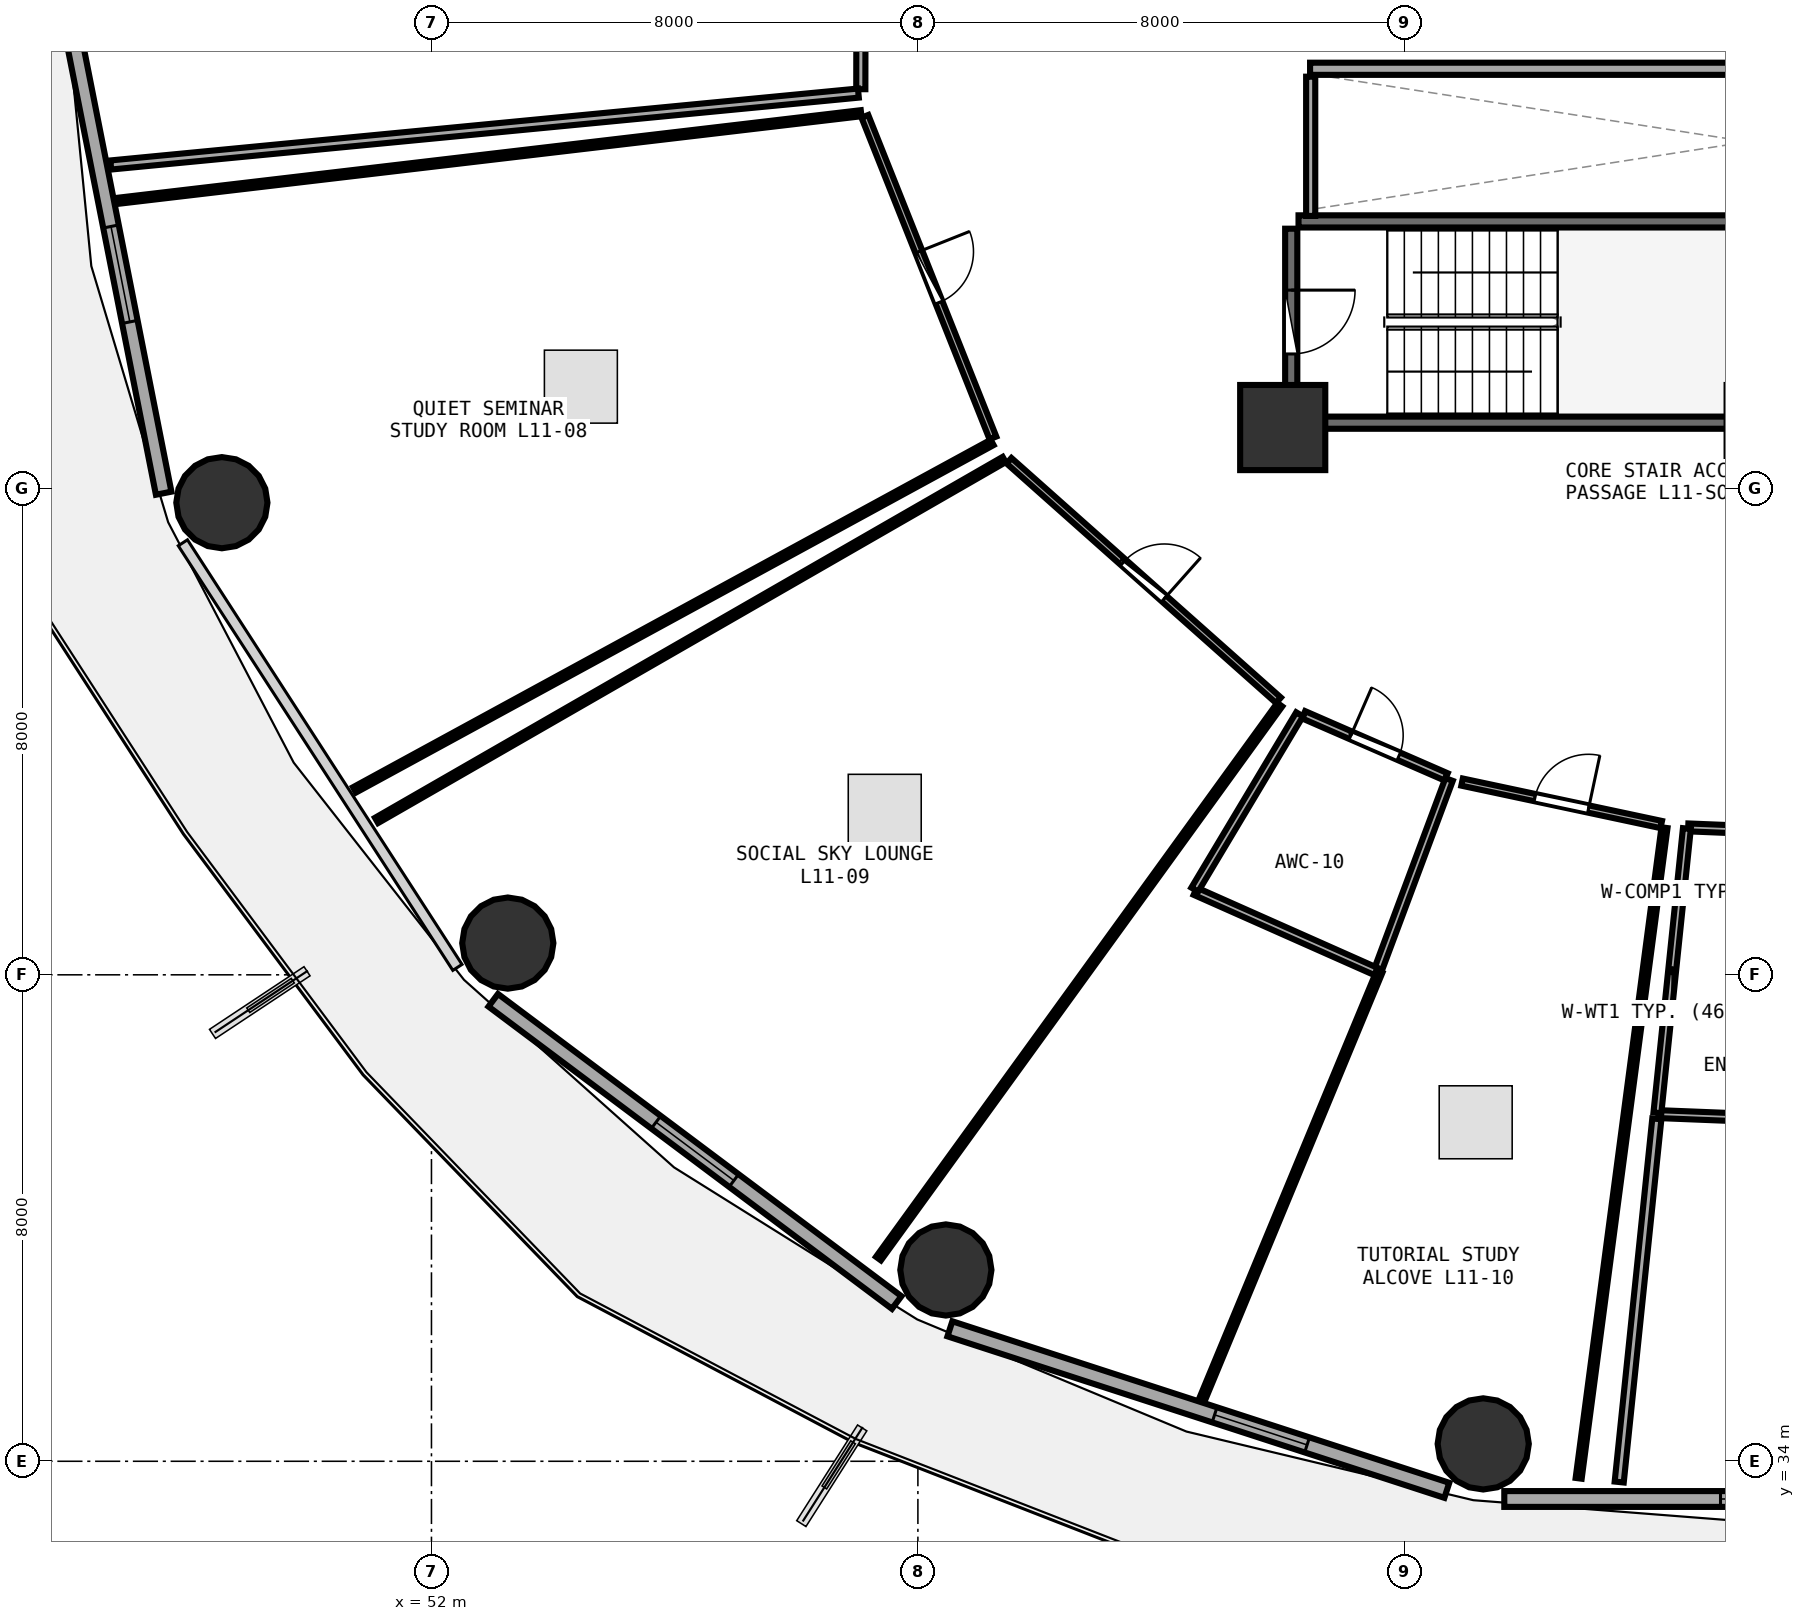
"""IFC4 building model, lengths in metres.
Left out: names, types, materials, properties, quantities, classifications, styles, units other than length and angle.
Written with IfcOpenShell. Run it as: python <this file> out.ifc"""

import sys

from ifc_helpers import new_model, si_unit, direction, frame, frame_2d, origin, origin_2d, place, context, subcontext, project, spatial, rectangle, circle, extrude, element, fill, save


model = new_model("IFC4")
c1 = context("Model", 3, precision=1e-05, world=origin(), true_north=direction((0.0, 1.0)))
c2 = subcontext(c1, "Body", "Model", "MODEL_VIEW")
j1 = project(units=[si_unit("LENGTHUNIT", "METRE"), si_unit("PLANEANGLEUNIT", "RADIAN")], contexts=[c1])
p1 = place(None, origin())
s1 = spatial("IfcSite", under=j1, at=p1, CompositionType="ELEMENT")
p2 = place(p1, origin())
s2 = spatial("IfcBuilding", under=s1, at=p2, CompositionType="ELEMENT")
p3 = place(p2, frame((0.0, 0.0, 45.0)))
s3 = spatial("IfcBuildingStorey", under=s2, at=p3, CompositionType="ELEMENT", Elevation=45.0)
p4 = place(p3, frame((66.0, 51.0, 0.0), z_axis=(0.0, 0.0, 1.0), x_axis=(1.0, 0.0, 0.0)))
e1 = element("IfcColumn", 1, at=p4, inside=s3, PredefinedType="PILASTER", context=c2, shape_type="SweptSolid", body=[
    extrude(rectangle(XDim=1.4, YDim=1.4, at=origin_2d()), origin(), (0.0, 0.0, 1.0), 3.75),
])
for number, where, z_axis, x_axis in (
    (2, (48.553, 49.764, 0.0), (0.0, 0.0, 1.0), (1.0, 0.0, 0.0)),
    (3, (53.256, 42.522, 0.0), (0.0, 0.0, 1.0), (1.0, 0.0, 0.0)),
    (4, (60.46, 37.146, 0.0), (0.0, 0.0, 1.0), (1.0, 0.0, 0.0)),
    (5, (69.298, 34.286, 0.0), (0.0, 0.0, 1.0), (1.0, 0.0, 0.0)),
):
    element("IfcColumn", number, at=place(p3, frame(where, z_axis=z_axis, x_axis=x_axis)), inside=s3, PredefinedType="COLUMN", context=c2, shape_type="SweptSolid", body=[
        extrude(circle(Radius=0.75, at=origin_2d()), origin(), (0.0, 0.0, 1.0), 3.75),
    ])
p5 = place(p3, frame((46.104, 57.477, 0.0), z_axis=(0.0, 0.0, 1.0), x_axis=(0.193726159581, -0.98105564322, 0.0)))
e6 = element("IfcWall", 6, at=p5, inside=s3, PredefinedType="SOLIDWALL", context=c2, shape_type="SweptSolid", body=[
    extrude(rectangle(XDim=7.703, YDim=0.26, at=frame_2d((3.851, 0.0))), origin(), (0.0, 0.0, 1.0), 3.475),
])
p6 = place(p5, frame((3.231, 0.0, 0.85)))
e7 = element("IfcOpeningElement", 7, at=p6, cuts=e6, PredefinedType="OPENING", context=c2, shape_type="SweptSolid", body=[
    extrude(rectangle(XDim=1.6, YDim=1.45, at=frame_2d((0.8, 0.725))), frame((0.0, 0.14, 0.0), z_axis=(0.0, -1.0, 0.0), x_axis=(1.0, 0.0, 0.0)), (0.0, 0.0, 1.0), 0.28),
])
p7 = place(p3, frame((53.016, 41.582, 0.0), z_axis=(0.0, 0.0, 1.0), x_axis=(0.80030733173, -0.599590005569, 0.0)))
e8 = element("IfcWall", 8, at=p7, inside=s3, PredefinedType="SOLIDWALL", context=c2, shape_type="SweptSolid", body=[
    extrude(rectangle(XDim=8.291, YDim=0.26, at=frame_2d((4.145, 0.0))), origin(), (0.0, 0.0, 1.0), 3.475),
])
p8 = place(p7, frame((3.345, 0.0, 0.85)))
e9 = element("IfcOpeningElement", 9, at=p8, cuts=e8, PredefinedType="OPENING", context=c2, shape_type="SweptSolid", body=[
    extrude(rectangle(XDim=1.6, YDim=1.45, at=frame_2d((0.8, 0.725))), frame((0.0, 0.14, 0.0), z_axis=(0.0, -1.0, 0.0), x_axis=(1.0, 0.0, 0.0)), (0.0, 0.0, 1.0), 0.28),
])
p9 = place(p3, frame((60.526, 36.178, 0.0), z_axis=(0.0, 0.0, 1.0), x_axis=(0.951039914291, -0.309068085421, 0.0)))
e10 = element("IfcWall", 10, at=p9, inside=s3, PredefinedType="SOLIDWALL", context=c2, shape_type="SweptSolid", body=[
    extrude(rectangle(XDim=8.594, YDim=0.26, at=frame_2d((4.297, 0.0))), origin(), (0.0, 0.0, 1.0), 3.475),
])
p10 = place(p9, frame((4.577, 0.0, 0.85)))
e11 = element("IfcOpeningElement", 11, at=p10, cuts=e10, PredefinedType="OPENING", context=c2, shape_type="SweptSolid", body=[
    extrude(rectangle(XDim=1.6, YDim=1.45, at=frame_2d((0.8, 0.725))), frame((0.0, 0.14, 0.0), z_axis=(0.0, -1.0, 0.0), x_axis=(1.0, 0.0, 0.0)), (0.0, 0.0, 1.0), 0.28),
])
p11 = place(p3, frame((69.644, 33.38, 0.0), z_axis=(0.0, 0.0, 1.0), x_axis=(1.0, 0.0, 0.0)))
e12 = element("IfcWall", 12, at=p11, inside=s3, PredefinedType="SOLIDWALL", context=c2, shape_type="SweptSolid", body=[
    extrude(rectangle(XDim=8.712, YDim=0.26, at=frame_2d((4.356, 0.0))), origin(), (0.0, 0.0, 1.0), 3.475),
])
p12 = place(p11, frame((3.556, 0.0, 0.85)))
e13 = element("IfcOpeningElement", 13, at=p12, cuts=e12, PredefinedType="OPENING", context=c2, shape_type="SweptSolid", body=[
    extrude(rectangle(XDim=1.6, YDim=1.45, at=frame_2d((0.8, 0.725))), frame((0.0, 0.14, 0.0), z_axis=(0.0, -1.0, 0.0), x_axis=(1.0, 0.0, 0.0)), (0.0, 0.0, 1.0), 0.28),
])
for number, where, z_axis, x_axis in (
    (14, (66.26, 51.08, 0.0), (0.0, 0.0, 1.0), (1.0, 0.0, 0.0)),
    (15, (73.42, 54.39, 0.0), (0.0, 0.0, 1.0), (-1.0, 0.0, 0.0)),
):
    element("IfcWall", number, at=place(p3, frame(where, z_axis=z_axis, x_axis=x_axis)), inside=s3, PredefinedType="SHEAR", context=c2, shape_type="SweptSolid", body=[
        extrude(rectangle(XDim=7.16, YDim=0.2, at=frame_2d((3.58, 0.0))), origin(), (0.0, 0.0, 1.0), 3.49),
    ])
p13 = place(p3, frame((66.14, 54.27, 0.0), z_axis=(0.0, 0.0, 1.0), x_axis=(0.0, -1.0, 0.0)))
e16 = element("IfcWall", 16, at=p13, inside=s3, PredefinedType="SHEAR", context=c2, shape_type="SweptSolid", body=[
    extrude(rectangle(XDim=3.07, YDim=0.2, at=frame_2d((1.535, 0.0))), origin(), (0.0, 0.0, 1.0), 3.49),
])
p14 = place(p13, frame((1.01, 0.0, 0.0)))
e17 = element("IfcOpeningElement", 17, at=p14, cuts=e16, PredefinedType="OPENING", context=c2, shape_type="SweptSolid", body=[
    extrude(rectangle(XDim=1.05, YDim=2.1, at=frame_2d((0.525, 1.05))), frame((0.0, 0.11, 0.0), z_axis=(0.0, -1.0, 0.0), x_axis=(1.0, 0.0, 0.0)), (0.0, 0.0, 1.0), 0.22),
])
p15 = place(p3, frame((66.45, 56.9, 0.0), z_axis=(0.0, 0.0, 1.0), x_axis=(1.0, 0.0, 0.0)))
e18 = element("IfcWall", 18, at=p15, inside=s3, PredefinedType="SOLIDWALL", context=c2, shape_type="SweptSolid", body=[
    extrude(rectangle(XDim=14.4, YDim=0.2, at=frame_2d((7.2, 0.0))), origin(), (0.0, 0.0, 1.0), 3.48),
])
p16 = place(p3, frame((66.46, 54.48, 0.0), z_axis=(0.0, 0.0, 1.0), x_axis=(0.0, 1.0, 0.0)))
e19 = element("IfcWall", 19, at=p16, inside=s3, PredefinedType="PARTITIONING", context=c2, shape_type="SweptSolid", body=[
    extrude(rectangle(XDim=2.29, YDim=0.15, at=frame_2d((1.145, 0.0))), origin(), (0.0, 0.0, 1.0), 3.48),
])
p17 = place(p3, frame((59.066, 59.475, 0.0), z_axis=(0.0, 0.0, 1.0), x_axis=(-0.001677287141, -0.999998593353, 0.0)))
e20 = element("IfcWall", 20, at=p17, inside=s3, PredefinedType="PARTITIONING", context=c2, shape_type="SweptSolid", body=[
    extrude(rectangle(XDim=2.911, YDim=0.15, at=frame_2d((1.456, 0.0))), origin(), (0.0, 0.0, 1.0), 2.875),
])
p18 = place(p17, frame((0.981, 0.0, 0.0)))
e21 = element("IfcOpeningElement", 21, at=p18, cuts=e20, PredefinedType="OPENING", context=c2, shape_type="SweptSolid", body=[
    extrude(rectangle(XDim=0.95, YDim=2.08, at=frame_2d((0.475, 1.04))), frame((0.0, 0.085, 0.0), z_axis=(0.0, -1.0, 0.0), x_axis=(1.0, 0.0, 0.0)), (0.0, 0.0, 1.0), 0.17),
])
p19 = place(p3, frame((59.128, 56.118, 0.0), z_axis=(0.0, 0.0, 1.0), x_axis=(0.369903929858, -0.929070009566, 0.0)))
e22 = element("IfcWall", 22, at=p19, inside=s3, PredefinedType="PARTITIONING", context=c2, shape_type="SweptSolid", body=[
    extrude(rectangle(XDim=5.693, YDim=0.12, at=frame_2d((2.846, 0.0))), origin(), (0.0, 0.0, 1.0), 2.875),
])
p20 = place(p19, frame((2.396, 0.0, 0.0)))
e23 = element("IfcOpeningElement", 23, at=p20, cuts=e22, PredefinedType="OPENING", context=c2, shape_type="SweptSolid", body=[
    extrude(rectangle(XDim=0.9, YDim=2.08, at=frame_2d((0.45, 1.04))), frame((0.0, 0.07, 0.0), z_axis=(0.0, -1.0, 0.0), x_axis=(1.0, 0.0, 0.0)), (0.0, 0.0, 1.0), 0.14),
])
p21 = place(p3, frame((61.499, 50.454, 0.0), z_axis=(0.0, 0.0, 1.0), x_axis=(0.747393415848, -0.664381729089, 0.0)))
e24 = element("IfcWall", 24, at=p21, inside=s3, PredefinedType="PARTITIONING", context=c2, shape_type="SweptSolid", body=[
    extrude(rectangle(XDim=5.929, YDim=0.12, at=frame_2d((2.965, 0.0))), origin(), (0.0, 0.0, 1.0), 2.875),
])
p22 = place(p21, frame((2.515, 0.0, 0.0)))
e25 = element("IfcOpeningElement", 25, at=p22, cuts=e24, PredefinedType="OPENING", context=c2, shape_type="SweptSolid", body=[
    extrude(rectangle(XDim=0.9, YDim=2.08, at=frame_2d((0.45, 1.04))), frame((0.0, 0.07, 0.0), z_axis=(0.0, -1.0, 0.0), x_axis=(1.0, 0.0, 0.0)), (0.0, 0.0, 1.0), 0.14),
])
p23 = place(p3, frame((66.343, 46.277, 0.0), z_axis=(0.0, 0.0, 1.0), x_axis=(0.916688793476, -0.399601871763, 0.0)))
e26 = element("IfcWall", 26, at=p23, inside=s3, PredefinedType="PLUMBINGWALL", context=c2, shape_type="SweptSolid", body=[
    extrude(rectangle(XDim=2.558, YDim=0.13, at=frame_2d((1.279, 0.0))), origin(), (0.0, 0.0, 1.0), 2.875),
])
p24 = place(p23, frame((0.849, 0.0, 0.0)))
e27 = element("IfcOpeningElement", 27, at=p24, cuts=e26, PredefinedType="OPENING", context=c2, shape_type="SweptSolid", body=[
    extrude(rectangle(XDim=0.86, YDim=2.05, at=frame_2d((0.43, 1.025))), frame((0.0, 0.075, 0.0), z_axis=(0.0, -1.0, 0.0), x_axis=(1.0, 0.0, 0.0)), (0.0, 0.0, 1.0), 0.15),
])
p25 = place(p3, frame((68.95, 45.169, 0.0), z_axis=(0.0, 0.0, 1.0), x_axis=(0.978041794992, -0.20840884638, 0.0)))
e28 = element("IfcWall", 28, at=p25, inside=s3, PredefinedType="PARTITIONING", context=c2, shape_type="SweptSolid", body=[
    extrude(rectangle(XDim=3.349, YDim=0.12, at=frame_2d((1.675, 0.0))), origin(), (0.0, 0.0, 1.0), 3.235),
])
p26 = place(p25, frame((1.225, 0.0, 0.0)))
e29 = element("IfcOpeningElement", 29, at=p26, cuts=e28, PredefinedType="OPENING", context=c2, shape_type="SweptSolid", body=[
    extrude(rectangle(XDim=0.9, YDim=2.08, at=frame_2d((0.45, 1.04))), frame((0.0, 0.07, 0.0), z_axis=(0.0, -1.0, 0.0), x_axis=(1.0, 0.0, 0.0)), (0.0, 0.0, 1.0), 0.14),
])
p27 = place(p3, frame((59.021, 56.5, 0.0), z_axis=(0.0, 0.0, 1.0), x_axis=(-0.995408087514, -0.095722198638, 0.0)))
e30 = element("IfcWall", 30, at=p27, inside=s3, PredefinedType="PARTITIONING", context=c2, shape_type="SweptSolid", body=[
    extrude(rectangle(XDim=12.352, YDim=0.15, at=frame_2d((6.176, 0.0))), origin(), (0.0, 0.0, 1.0), 2.875),
])
p28 = place(p3, frame((61.221, 50.755, 0.0), z_axis=(0.0, 0.0, 1.0), x_axis=(-0.878114235828, -0.478451030761, 0.0)))
e31 = element("IfcWall", 31, at=p28, inside=s3, PredefinedType="PARTITIONING", context=c2, shape_type="SweptSolid", body=[
    extrude(rectangle(XDim=11.942, YDim=0.1, at=frame_2d((5.971, 0.0))), origin(), (0.0, 0.0, 1.0), 2.875),
])
p29 = place(p3, frame((46.808, 54.725, 0.0), z_axis=(0.0, 0.0, 1.0), x_axis=(0.993128309916, 0.117030594475, 0.0)))
e32 = element("IfcWall", 32, at=p29, inside=s3, PredefinedType="PARTITIONING", context=c2, shape_type="SweptSolid", body=[
    extrude(rectangle(XDim=12.344, YDim=0.1, at=frame_2d((6.172, 0.0))), origin(), (0.0, 0.0, 1.0), 2.875),
])
p30 = place(p3, frame((65.951, 46.443, 0.0), z_axis=(0.0, 0.0, 1.0), x_axis=(-0.586718941426, -0.809790641939, 0.0)))
e33 = element("IfcWall", 33, at=p30, inside=s3, PredefinedType="PARTITIONING", context=c2, shape_type="SweptSolid", body=[
    extrude(rectangle(XDim=11.249, YDim=0.1, at=frame_2d((5.625, 0.0))), origin(), (0.0, 0.0, 1.0), 2.875),
])
p31 = place(p3, frame((51.097, 44.539, 0.0), z_axis=(0.0, 0.0, 1.0), x_axis=(0.866911397605, 0.498462264071, 0.0)))
e34 = element("IfcWall", 34, at=p31, inside=s3, PredefinedType="PARTITIONING", context=c2, shape_type="SweptSolid", body=[
    extrude(rectangle(XDim=11.907, YDim=0.1, at=frame_2d((5.954, 0.0))), origin(), (0.0, 0.0, 1.0), 2.875),
])
p32 = place(p3, frame((68.736, 45.212, 0.0), z_axis=(0.0, 0.0, 1.0), x_axis=(-0.349729505813, -0.93685072064, 0.0)))
e35 = element("IfcWall", 35, at=p32, inside=s3, PredefinedType="PLUMBINGWALL", context=c2, shape_type="SweptSolid", body=[
    extrude(rectangle(XDim=3.36, YDim=0.13, at=frame_2d((1.68, 0.0))), origin(), (0.0, 0.0, 1.0), 2.875),
])
p33 = place(p3, frame((67.536, 42.054, 0.0), z_axis=(0.0, 0.0, 1.0), x_axis=(-0.913941429535, 0.405846108002, 0.0)))
e36 = element("IfcWall", 36, at=p33, inside=s3, PredefinedType="PLUMBINGWALL", context=c2, shape_type="SweptSolid", body=[
    extrude(rectangle(XDim=3.254, YDim=0.13, at=frame_2d((1.627, 0.0))), origin(), (0.0, 0.0, 1.0), 3.48),
])
p34 = place(p3, frame((64.553, 43.4, 0.0), z_axis=(0.0, 0.0, 1.0), x_axis=(0.513234244366, 0.858248571458, 0.0)))
e37 = element("IfcWall", 37, at=p34, inside=s3, PredefinedType="PLUMBINGWALL", context=c2, shape_type="SweptSolid", body=[
    extrude(rectangle(XDim=3.36, YDim=0.13, at=frame_2d((1.68, 0.0))), origin(), (0.0, 0.0, 1.0), 3.235),
])
p35 = place(p3, frame((72.279, 44.419, 0.0), z_axis=(0.0, 0.0, 1.0), x_axis=(-0.130800348515, -0.991408729449, 0.0)))
e38 = element("IfcWall", 38, at=p35, inside=s3, PredefinedType="PARTITIONING", context=c2, shape_type="SweptSolid", body=[
    extrude(rectangle(XDim=10.792, YDim=0.1, at=frame_2d((5.396, 0.0))), origin(), (0.0, 0.0, 1.0), 2.875),
])
p36 = place(p3, frame((64.673, 35.015, 0.0), z_axis=(0.0, 0.0, 1.0), x_axis=(0.383188399733, 0.923670206464, 0.0)))
e39 = element("IfcWall", 39, at=p36, inside=s3, PredefinedType="PARTITIONING", context=c2, shape_type="SweptSolid", body=[
    extrude(rectangle(XDim=7.619, YDim=0.1, at=frame_2d((3.81, 0.0))), origin(), (0.0, 0.0, 1.0), 2.875),
])
p37 = place(p3, frame((72.669, 44.424, 0.0), z_axis=(0.0, 0.0, 1.0), x_axis=(0.999183175144, -0.040410178275, 0.0)))
e40 = element("IfcWall", 40, at=p37, inside=s3, PredefinedType="PLUMBINGWALL", context=c2, shape_type="SweptSolid", body=[
    extrude(rectangle(XDim=1.323, YDim=0.13, at=frame_2d((0.662, 0.0))), origin(), (0.0, 0.0, 1.0), 3.48),
])
p38 = place(p3, frame((73.995, 39.637, 0.0), z_axis=(0.0, 0.0, 1.0), x_axis=(-0.999203104114, 0.039914367441, 0.0)))
e41 = element("IfcWall", 41, at=p38, inside=s3, PredefinedType="PLUMBINGWALL", context=c2, shape_type="SweptSolid", body=[
    extrude(rectangle(XDim=1.817, YDim=0.13, at=frame_2d((0.908, 0.0))), origin(), (0.0, 0.0, 1.0), 3.48),
])
p39 = place(p3, frame((72.162, 39.73, 0.0), z_axis=(0.0, 0.0, 1.0), x_axis=(0.103159659153, 0.994664810237, 0.0)))
e42 = element("IfcWall", 42, at=p39, inside=s3, PredefinedType="PLUMBINGWALL", context=c2, shape_type="SweptSolid", body=[
    extrude(rectangle(XDim=4.7, YDim=0.13, at=frame_2d((2.35, 0.0))), origin(), (0.0, 0.0, 1.0), 3.175),
])
p40 = place(p3, frame((71.534, 33.659, 0.0), z_axis=(0.0, 0.0, 1.0), x_axis=(0.103033712488, 0.994677864482, 0.0)))
e43 = element("IfcWall", 43, at=p40, inside=s3, PredefinedType="PARTITIONING", context=c2, shape_type="SweptSolid", body=[
    extrude(rectangle(XDim=6.004, YDim=0.15, at=frame_2d((3.002, 0.0))), origin(), (0.0, 0.0, 1.0), 2.875),
])
p41 = place(p6, origin())
e44 = element("IfcWindow", 44, at=p41, inside=s3, PartitioningType="SINGLE_PANEL", PredefinedType="WINDOW", context=c2, shape_type="SweptSolid", body=[
    extrude(rectangle(XDim=1.6, YDim=1.45, at=frame_2d((0.8, 0.725))), frame((0.0, 0.03, 0.0), z_axis=(0.0, -1.0, 0.0), x_axis=(1.0, 0.0, 0.0)), (0.0, 0.0, 1.0), 0.06),
])
fill(e7, e44)
p42 = place(p8, origin())
e45 = element("IfcWindow", 45, at=p42, inside=s3, PartitioningType="SINGLE_PANEL", PredefinedType="WINDOW", context=c2, shape_type="SweptSolid", body=[
    extrude(rectangle(XDim=1.6, YDim=1.45, at=frame_2d((0.8, 0.725))), frame((0.0, 0.03, 0.0), z_axis=(0.0, -1.0, 0.0), x_axis=(1.0, 0.0, 0.0)), (0.0, 0.0, 1.0), 0.06),
])
fill(e9, e45)
p43 = place(p10, origin())
e46 = element("IfcWindow", 46, at=p43, inside=s3, PartitioningType="SINGLE_PANEL", PredefinedType="WINDOW", context=c2, shape_type="SweptSolid", body=[
    extrude(rectangle(XDim=1.6, YDim=1.45, at=frame_2d((0.8, 0.725))), frame((0.0, 0.03, 0.0), z_axis=(0.0, -1.0, 0.0), x_axis=(1.0, 0.0, 0.0)), (0.0, 0.0, 1.0), 0.06),
])
fill(e11, e46)
p44 = place(p12, origin())
e47 = element("IfcWindow", 47, at=p44, inside=s3, PartitioningType="SINGLE_PANEL", PredefinedType="WINDOW", context=c2, shape_type="SweptSolid", body=[
    extrude(rectangle(XDim=1.6, YDim=1.45, at=frame_2d((0.8, 0.725))), frame((0.0, 0.03, 0.0), z_axis=(0.0, -1.0, 0.0), x_axis=(1.0, 0.0, 0.0)), (0.0, 0.0, 1.0), 0.06),
])
fill(e13, e47)
p45 = place(p14, origin())
e48 = element("IfcDoor", 48, at=p45, inside=s3, OperationType="SINGLE_SWING_LEFT", PredefinedType="DOOR", context=c2, shape_type="SweptSolid", body=[
    extrude(rectangle(XDim=1.05, YDim=2.1, at=frame_2d((0.525, 1.05))), frame((0.0, 0.025, 0.0), z_axis=(0.0, -1.0, 0.0), x_axis=(1.0, 0.0, 0.0)), (0.0, 0.0, 1.0), 0.05),
])
fill(e17, e48)
p46 = place(p20, origin())
e49 = element("IfcDoor", 49, at=p46, inside=s3, OperationType="SINGLE_SWING_LEFT", PredefinedType="DOOR", context=c2, shape_type="SweptSolid", body=[
    extrude(rectangle(XDim=0.9, YDim=2.08, at=frame_2d((0.45, 1.04))), frame((0.0, 0.025, 0.0), z_axis=(0.0, -1.0, 0.0), x_axis=(1.0, 0.0, 0.0)), (0.0, 0.0, 1.0), 0.05),
])
fill(e23, e49)
p47 = place(p22, origin())
e50 = element("IfcDoor", 50, at=p47, inside=s3, OperationType="SINGLE_SWING_RIGHT", PredefinedType="DOOR", context=c2, shape_type="SweptSolid", body=[
    extrude(rectangle(XDim=0.9, YDim=2.08, at=frame_2d((0.45, 1.04))), frame((0.0, 0.025, 0.0), z_axis=(0.0, -1.0, 0.0), x_axis=(1.0, 0.0, 0.0)), (0.0, 0.0, 1.0), 0.05),
])
fill(e25, e50)
p48 = place(p24, origin())
e51 = element("IfcDoor", 51, at=p48, inside=s3, OperationType="SINGLE_SWING_LEFT", PredefinedType="DOOR", context=c2, shape_type="SweptSolid", body=[
    extrude(rectangle(XDim=0.86, YDim=2.05, at=frame_2d((0.43, 1.025))), frame((0.0, 0.025, 0.0), z_axis=(0.0, -1.0, 0.0), x_axis=(1.0, 0.0, 0.0)), (0.0, 0.0, 1.0), 0.05),
])
fill(e27, e51)
p49 = place(p26, origin())
e52 = element("IfcDoor", 52, at=p49, inside=s3, OperationType="SINGLE_SWING_RIGHT", PredefinedType="DOOR", context=c2, shape_type="SweptSolid", body=[
    extrude(rectangle(XDim=0.9, YDim=2.08, at=frame_2d((0.45, 1.04))), frame((0.0, 0.025, 0.0), z_axis=(0.0, -1.0, 0.0), x_axis=(1.0, 0.0, 0.0)), (0.0, 0.0, 1.0), 0.05),
])
fill(e29, e52)
save(model, sys.argv[1])
